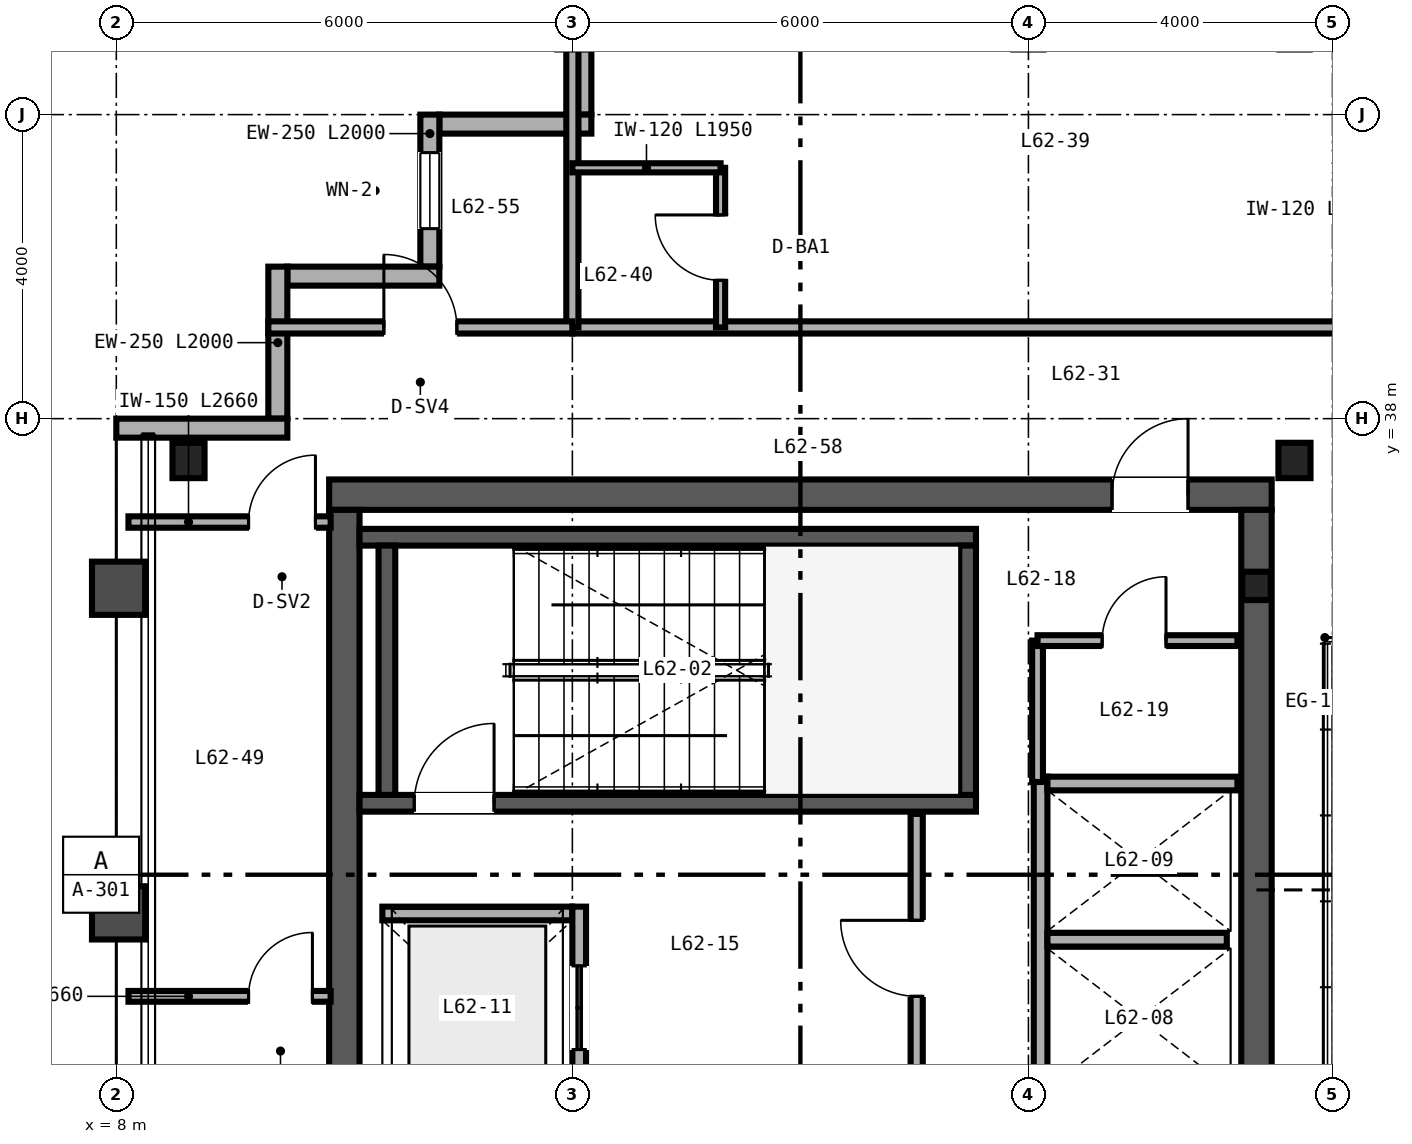
"""IFC4 building model, lengths in metres.
Left out: names, types, materials, properties, quantities, classifications, styles, units other than length and angle.
Written with IfcOpenShell. Run it as: python <this file> out.ifc"""

import sys

from ifc_helpers import new_model, si_unit, direction, frame, frame_2d, origin, origin_2d, place, context, subcontext, project, spatial, rectangle, i_section, extrude, source, transform, mapped, element, fill, save


model = new_model("IFC4")
c1 = context("Model", 3, precision=1e-05, world=origin(), true_north=direction((0.0, 1.0)))
c2 = subcontext(c1, "Body", "Model", "MODEL_VIEW")
j1 = project(units=[si_unit("LENGTHUNIT", "METRE"), si_unit("PLANEANGLEUNIT", "RADIAN")], contexts=[c1])
p1 = place(None, origin())
s1 = spatial("IfcSite", under=j1, at=p1, CompositionType="ELEMENT")
p2 = place(p1, origin())
s2 = spatial("IfcBuilding", under=s1, at=p2, CompositionType="ELEMENT")
p3 = place(p2, frame((0.0, 0.0, 247.2)))
s3 = spatial("IfcBuildingStorey", under=s2, at=p3, CompositionType="ELEMENT", Elevation=247.2)
m1 = source(origin(), c2, "Body", "SweptSolid", [
    extrude(i_section(OverallWidth=0.374, OverallDepth=0.373, WebThickness=0.016, FlangeThickness=0.026, FilletRadius=0.025, at=origin_2d()), origin(), (0.0, 0.0, 1.0), 3.6),
])
p4 = place(p3, frame((23.0, 35.8, 0.0), z_axis=(0.0, 0.0, 1.0), x_axis=(1.0, 0.0, 0.0)))
e1 = element("IfcColumn", 1, at=p4, inside=s3, PredefinedType="COLUMN", context=c2, shape_type="MappedRepresentation", body=[
    mapped(m1, transform((0.0, 0.0, 0.0), scale=1.0)),
])
p5 = place(p3, frame((10.8, 37.0, 0.0), z_axis=(0.0, 0.0, 1.0), x_axis=(1.0, 0.0, 0.0)))
e2 = element("IfcWall", 2, at=p5, inside=s3, PredefinedType="SHEAR", context=c2, shape_type="SweptSolid", body=[
    extrude(rectangle(XDim=12.4, YDim=0.4, at=frame_2d((6.2, 0.0))), origin(), (0.0, 0.0, 1.0), 3.38),
])
p6 = place(p5, frame((10.3, 0.0, 0.0)))
e3 = element("IfcOpeningElement", 3, at=p6, cuts=e2, PredefinedType="OPENING", context=c2, shape_type="SweptSolid", body=[
    extrude(rectangle(XDim=1.0, YDim=2.15, at=frame_2d((0.5, 1.075))), frame((0.0, 0.21, 0.0), z_axis=(0.0, -1.0, 0.0), x_axis=(1.0, 0.0, 0.0)), (0.0, 0.0, 1.0), 0.42),
])
for number, where, z_axis, x_axis in (
    (4, (11.0, 15.2, 0.0), (0.0, 0.0, 1.0), (0.0, 1.0, 0.0)),
    (5, (23.0, 15.2, 0.0), (0.0, 0.0, 1.0), (0.0, 1.0, 0.0)),
):
    element("IfcWall", number, at=place(p3, frame(where, z_axis=z_axis, x_axis=x_axis)), inside=s3, PredefinedType="SHEAR", context=c2, shape_type="SweptSolid", body=[
        extrude(rectangle(XDim=21.6, YDim=0.4, at=frame_2d((10.8, 0.0))), origin(), (0.0, 0.0, 1.0), 3.38),
    ])
p7 = place(p3, frame((11.2, 32.94, 0.0), z_axis=(0.0, 0.0, 1.0), x_axis=(1.0, 0.0, 0.0)))
e6 = element("IfcWall", 6, at=p7, inside=s3, PredefinedType="SHEAR", context=c2, shape_type="SweptSolid", body=[
    extrude(rectangle(XDim=8.11, YDim=0.22, at=frame_2d((4.055, 0.0))), origin(), (0.0, 0.0, 1.0), 3.4),
])
p8 = place(p7, frame((0.72, 0.0, 0.0)))
e7 = element("IfcOpeningElement", 7, at=p8, cuts=e6, PredefinedType="OPENING", context=c2, shape_type="SweptSolid", body=[
    extrude(rectangle(XDim=1.05, YDim=2.15, at=frame_2d((0.525, 1.075))), frame((0.0, 0.12, 0.0), z_axis=(0.0, -1.0, 0.0), x_axis=(1.0, 0.0, 0.0)), (0.0, 0.0, 1.0), 0.24),
])
p9 = place(p3, frame((11.2, 36.44, 0.0), z_axis=(0.0, 0.0, 1.0), x_axis=(1.0, 0.0, 0.0)))
e8 = element("IfcWall", 8, at=p9, inside=s3, PredefinedType="SHEAR", context=c2, shape_type="SweptSolid", body=[
    extrude(rectangle(XDim=8.11, YDim=0.22, at=frame_2d((4.055, 0.0))), origin(), (0.0, 0.0, 1.0), 3.4),
])
for number, where, z_axis, x_axis in (
    (9, (11.56, 33.05, 0.0), (0.0, 0.0, 1.0), (0.0, 1.0, 0.0)),
    (10, (19.2, 33.05, 0.0), (0.0, 0.0, 1.0), (0.0, 1.0, 0.0)),
):
    element("IfcWall", number, at=place(p3, frame(where, z_axis=z_axis, x_axis=x_axis)), inside=s3, PredefinedType="SHEAR", context=c2, shape_type="SweptSolid", body=[
        extrude(rectangle(XDim=3.28, YDim=0.22, at=frame_2d((1.64, 0.0))), origin(), (0.0, 0.0, 1.0), 3.4),
    ])
m2 = source(origin(), c2, "Body", "SweptSolid", [
    extrude(i_section(OverallWidth=0.422, OverallDepth=0.465, WebThickness=0.045, FlangeThickness=0.073, FilletRadius=0.025, at=origin_2d()), origin(), (0.0, 0.0, 1.0), 3.38),
])
for number, where, z_axis, x_axis in (
    (11, (8.95, 37.45, 0.0), (0.0, 0.0, 1.0), (1.0, 0.0, 0.0)),
    (12, (23.5, 37.45, 0.0), (0.0, 0.0, 1.0), (1.0, 0.0, 0.0)),
):
    element("IfcColumn", number, at=place(p3, frame(where, z_axis=z_axis, x_axis=x_axis)), inside=s3, PredefinedType="COLUMN", context=c2, shape_type="MappedRepresentation", body=[
        mapped(m2, transform((0.0, 0.0, 0.0), scale=1.0)),
    ])
p10 = place(p3, frame((14.125, 44.0, 0.0), z_axis=(0.0, 0.0, 1.0), x_axis=(0.0, -1.0, 0.0)))
e13 = element("IfcWall", 13, at=p10, inside=s3, PredefinedType="SOLIDWALL", context=c2, shape_type="SweptSolid", body=[
    extrude(rectangle(XDim=2.0, YDim=0.25, at=frame_2d((1.0, 0.0))), origin(), (0.0, 0.0, 1.0), 2.687),
])
p11 = place(p3, frame((14.25, 41.875, 0.0), z_axis=(0.0, 0.0, 1.0), x_axis=(-1.0, 0.0, 0.0)))
e14 = element("IfcWall", 14, at=p11, inside=s3, PredefinedType="SOLIDWALL", context=c2, shape_type="SweptSolid", body=[
    extrude(rectangle(XDim=2.0, YDim=0.25, at=frame_2d((1.0, 0.0))), origin(), (0.0, 0.0, 1.0), 3.38),
])
p12 = place(p3, frame((12.125, 42.0, 0.0), z_axis=(0.0, 0.0, 1.0), x_axis=(0.0, -1.0, 0.0)))
e15 = element("IfcWall", 15, at=p12, inside=s3, PredefinedType="SOLIDWALL", context=c2, shape_type="SweptSolid", body=[
    extrude(rectangle(XDim=2.0, YDim=0.25, at=frame_2d((1.0, 0.0))), origin(), (0.0, 0.0, 1.0), 3.38),
])
p13 = place(p12, frame((0.5, 0.0, 0.85)))
e16 = element("IfcOpeningElement", 16, at=p13, cuts=e15, PredefinedType="OPENING", context=c2, shape_type="SweptSolid", body=[
    extrude(rectangle(XDim=1.0, YDim=1.9, at=frame_2d((0.5, 0.95))), frame((0.0, 0.135, 0.0), z_axis=(0.0, -1.0, 0.0), x_axis=(1.0, 0.0, 0.0)), (0.0, 0.0, 1.0), 0.27),
])
for number, where, z_axis, x_axis in (
    (17, (12.25, 39.875, 0.0), (0.0, 0.0, 1.0), (-1.0, 0.0, 0.0)),
    (18, (10.125, 40.0, 0.0), (0.0, 0.0, 1.0), (0.0, -1.0, 0.0)),
):
    element("IfcWall", number, at=place(p3, frame(where, z_axis=z_axis, x_axis=x_axis)), inside=s3, PredefinedType="SOLIDWALL", context=c2, shape_type="SweptSolid", body=[
        extrude(rectangle(XDim=2.0, YDim=0.25, at=frame_2d((1.0, 0.0))), origin(), (0.0, 0.0, 1.0), 3.38),
    ])
p14 = place(p3, frame((10.25, 37.875, 0.0), z_axis=(0.0, 0.0, 1.0), x_axis=(-1.0, 0.0, 0.0)))
e19 = element("IfcWall", 19, at=p14, inside=s3, PredefinedType="SOLIDWALL", context=c2, shape_type="SweptSolid", body=[
    extrude(rectangle(XDim=2.25, YDim=0.25, at=frame_2d((1.125, 0.0))), origin(), (0.0, 0.0, 1.0), 3.38),
])
p15 = place(p3, frame((20.16, 29.0, 0.0), z_axis=(0.0, 0.0, 1.0), x_axis=(0.0, 1.0, 0.0)))
e20 = element("IfcWall", 20, at=p15, inside=s3, PredefinedType="SOLIDWALL", context=c2, shape_type="SweptSolid", body=[
    extrude(rectangle(XDim=4.29, YDim=0.18, at=frame_2d((2.145, 0.0))), origin(), (0.0, 0.0, 1.0), 3.38),
])
p16 = place(p3, frame((20.25, 33.2, 0.0), z_axis=(0.0, 0.0, 1.0), x_axis=(1.0, 0.0, 0.0)))
e21 = element("IfcWall", 21, at=p16, inside=s3, PredefinedType="SOLIDWALL", context=c2, shape_type="SweptSolid", body=[
    extrude(rectangle(XDim=2.5, YDim=0.18, at=frame_2d((1.25, 0.0))), origin(), (0.0, 0.0, 1.0), 3.38),
])
p17 = place(p3, frame((20.25, 31.145, 0.0), z_axis=(0.0, 0.0, 1.0), x_axis=(1.0, 0.0, 0.0)))
e22 = element("IfcWall", 22, at=p17, inside=s3, PredefinedType="SOLIDWALL", context=c2, shape_type="SweptSolid", body=[
    extrude(rectangle(XDim=2.36, YDim=0.18, at=frame_2d((1.18, 0.0))), origin(), (0.0, 0.0, 1.0), 3.38),
])
p18 = place(p3, frame((11.5, 31.49, 0.0), z_axis=(0.0, 0.0, 1.0), x_axis=(1.0, 0.0, 0.0)))
e23 = element("IfcWall", 23, at=p18, inside=s3, PredefinedType="SOLIDWALL", context=c2, shape_type="SweptSolid", body=[
    extrude(rectangle(XDim=2.5, YDim=0.18, at=frame_2d((1.25, 0.0))), origin(), (0.0, 0.0, 1.0), 3.38),
])
p19 = place(p3, frame((14.09, 28.92, 0.0), z_axis=(0.0, 0.0, 1.0), x_axis=(0.0, 1.0, 0.0)))
e24 = element("IfcWall", 24, at=p19, inside=s3, PredefinedType="SOLIDWALL", context=c2, shape_type="SweptSolid", body=[
    extrude(rectangle(XDim=2.66, YDim=0.18, at=frame_2d((1.33, 0.0))), origin(), (0.0, 0.0, 1.0), 3.38),
])
p20 = place(p19, frame((0.78, 0.0, 0.0)))
e25 = element("IfcOpeningElement", 25, at=p20, cuts=e24, PredefinedType="OPENING", context=c2, shape_type="SweptSolid", body=[
    extrude(rectangle(XDim=1.1, YDim=2.2, at=frame_2d((0.55, 1.1))), frame((0.0, 0.1, 0.0), z_axis=(0.0, -1.0, 0.0), x_axis=(1.0, 0.0, 0.0)), (0.0, 0.0, 1.0), 0.2),
])
p21 = place(p3, frame((18.53, 28.9, 0.0), z_axis=(0.0, 0.0, 1.0), x_axis=(0.0, 1.0, 0.0)))
e26 = element("IfcWall", 26, at=p21, inside=s3, PredefinedType="PARTITIONING", context=c2, shape_type="SweptSolid", body=[
    extrude(rectangle(XDim=3.9, YDim=0.16, at=frame_2d((1.95, 0.0))), origin(), (0.0, 0.0, 1.0), 3.38),
])
p22 = place(p21, frame((1.5, 0.0, 0.0)))
e27 = element("IfcOpeningElement", 27, at=p22, cuts=e26, PredefinedType="OPENING", context=c2, shape_type="SweptSolid", body=[
    extrude(rectangle(XDim=1.0, YDim=2.15, at=frame_2d((0.5, 1.075))), frame((0.0, 0.09, 0.0), z_axis=(0.0, -1.0, 0.0), x_axis=(1.0, 0.0, 0.0)), (0.0, 0.0, 1.0), 0.18),
])
p23 = place(p3, frame((20.12, 33.22, 0.0), z_axis=(0.0, 0.0, 1.0), x_axis=(0.0, 1.0, 0.0)))
e28 = element("IfcWall", 28, at=p23, inside=s3, PredefinedType="PARTITIONING", context=c2, shape_type="SweptSolid", body=[
    extrude(rectangle(XDim=1.86, YDim=0.142, at=frame_2d((0.93, 0.0))), origin(), (0.0, 0.0, 1.0), 3.38),
])
p24 = place(p3, frame((20.12, 35.08, 0.0), z_axis=(0.0, 0.0, 1.0), x_axis=(1.0, 0.0, 0.0)))
e29 = element("IfcWall", 29, at=p24, inside=s3, PredefinedType="PARTITIONING", context=c2, shape_type="SweptSolid", body=[
    extrude(rectangle(XDim=2.63, YDim=0.142, at=frame_2d((1.315, 0.0))), origin(), (0.0, 0.0, 1.0), 3.38),
])
p25 = place(p24, frame((0.85, 0.0, 0.0)))
e30 = element("IfcOpeningElement", 30, at=p25, cuts=e29, PredefinedType="OPENING", context=c2, shape_type="SweptSolid", body=[
    extrude(rectangle(XDim=0.84, YDim=2.1, at=frame_2d((0.42, 1.05))), frame((0.0, 0.081, 0.0), z_axis=(0.0, -1.0, 0.0), x_axis=(1.0, 0.0, 0.0)), (0.0, 0.0, 1.0), 0.162),
])
p26 = place(p3, frame((14.0, 39.2, 0.0), z_axis=(0.0, 0.0, 1.0), x_axis=(1.0, 0.0, 0.0)))
e31 = element("IfcWall", 31, at=p26, inside=s3, PredefinedType="PARTITIONING", context=c2, shape_type="SweptSolid", body=[
    extrude(rectangle(XDim=36.0, YDim=0.16, at=frame_2d((18.0, 0.0))), origin(), (0.0, 0.0, 1.0), 2.923),
])
p27 = place(p26, frame((10.7, 0.0, 0.0)))
e32 = element("IfcOpeningElement", 32, at=p27, cuts=e31, PredefinedType="OPENING", context=c2, shape_type="SweptSolid", body=[
    extrude(rectangle(XDim=0.98, YDim=2.2, at=frame_2d((0.49, 1.1))), frame((0.0, 0.09, 0.0), z_axis=(0.0, -1.0, 0.0), x_axis=(1.0, 0.0, 0.0)), (0.0, 0.0, 1.0), 0.18),
])
p28 = place(p26, frame((22.7, 0.0, 0.0)))
e33 = element("IfcOpeningElement", 33, at=p28, cuts=e31, PredefinedType="OPENING", context=c2, shape_type="SweptSolid", body=[
    extrude(rectangle(XDim=0.98, YDim=2.2, at=frame_2d((0.49, 1.1))), frame((0.0, 0.09, 0.0), z_axis=(0.0, -1.0, 0.0), x_axis=(1.0, 0.0, 0.0)), (0.0, 0.0, 1.0), 0.18),
])
p29 = place(p26, frame((34.7, 0.0, 0.0)))
e34 = element("IfcOpeningElement", 34, at=p29, cuts=e31, PredefinedType="OPENING", context=c2, shape_type="SweptSolid", body=[
    extrude(rectangle(XDim=0.98, YDim=2.2, at=frame_2d((0.49, 1.1))), frame((0.0, 0.09, 0.0), z_axis=(0.0, -1.0, 0.0), x_axis=(1.0, 0.0, 0.0)), (0.0, 0.0, 1.0), 0.18),
])
p30 = place(p3, frame((14.0, 39.2, 0.0), z_axis=(0.0, 0.0, 1.0), x_axis=(0.0, 1.0, 0.0)))
e35 = element("IfcWall", 35, at=p30, inside=s3, PredefinedType="PARTITIONING", context=c2, shape_type="SweptSolid", body=[
    extrude(rectangle(XDim=4.44, YDim=0.16, at=frame_2d((2.22, 0.0))), origin(), (0.0, 0.0, 1.0), 2.687),
])
p31 = place(p3, frame((15.95, 39.2, 0.0), z_axis=(0.0, 0.0, 1.0), x_axis=(0.0, 1.0, 0.0)))
e36 = element("IfcWall", 36, at=p31, inside=s3, PredefinedType="PARTITIONING", context=c2, shape_type="SweptSolid", body=[
    extrude(rectangle(XDim=2.1, YDim=0.12, at=frame_2d((1.05, 0.0))), origin(), (0.0, 0.0, 1.0), 3.38),
])
p32 = place(p31, frame((0.62, 0.0, 0.0)))
e37 = element("IfcOpeningElement", 37, at=p32, cuts=e36, PredefinedType="OPENING", context=c2, shape_type="SweptSolid", body=[
    extrude(rectangle(XDim=0.86, YDim=2.1, at=frame_2d((0.43, 1.05))), frame((0.0, 0.07, 0.0), z_axis=(0.0, -1.0, 0.0), x_axis=(1.0, 0.0, 0.0)), (0.0, 0.0, 1.0), 0.14),
])
p33 = place(p3, frame((14.0, 41.3, 0.0), z_axis=(0.0, 0.0, 1.0), x_axis=(1.0, 0.0, 0.0)))
e38 = element("IfcWall", 38, at=p33, inside=s3, PredefinedType="PARTITIONING", context=c2, shape_type="SweptSolid", body=[
    extrude(rectangle(XDim=1.95, YDim=0.12, at=frame_2d((0.975, 0.0))), origin(), (0.0, 0.0, 1.0), 3.38),
])
p34 = place(p3, frame((8.16, 36.64, 0.0), z_axis=(0.0, 0.0, 1.0), x_axis=(1.0, 0.0, 0.0)))
e39 = element("IfcWall", 39, at=p34, inside=s3, PredefinedType="PARTITIONING", context=c2, shape_type="SweptSolid", body=[
    extrude(rectangle(XDim=2.66, YDim=0.15, at=frame_2d((1.33, 0.0))), origin(), (0.0, 0.0, 1.0), 2.763),
])
p35 = place(p34, frame((1.58, 0.0, 0.0)))
e40 = element("IfcOpeningElement", 40, at=p35, cuts=e39, PredefinedType="OPENING", context=c2, shape_type="SweptSolid", body=[
    extrude(rectangle(XDim=0.88, YDim=2.15, at=frame_2d((0.44, 1.075))), frame((0.0, 0.085, 0.0), z_axis=(0.0, -1.0, 0.0), x_axis=(1.0, 0.0, 0.0)), (0.0, 0.0, 1.0), 0.17),
])
p36 = place(p3, frame((8.16, 30.4, 0.0), z_axis=(0.0, 0.0, 1.0), x_axis=(1.0, 0.0, 0.0)))
e41 = element("IfcWall", 41, at=p36, inside=s3, PredefinedType="PARTITIONING", context=c2, shape_type="SweptSolid", body=[
    extrude(rectangle(XDim=2.66, YDim=0.142, at=frame_2d((1.33, 0.0))), origin(), (0.0, 0.0, 1.0), 2.763),
])
p37 = place(p36, frame((1.58, 0.0, 0.0)))
e42 = element("IfcOpeningElement", 42, at=p37, cuts=e41, PredefinedType="OPENING", context=c2, shape_type="SweptSolid", body=[
    extrude(rectangle(XDim=0.84, YDim=2.1, at=frame_2d((0.42, 1.05))), frame((0.0, 0.081, 0.0), z_axis=(0.0, -1.0, 0.0), x_axis=(1.0, 0.0, 0.0)), (0.0, 0.0, 1.0), 0.162),
])
p38 = place(p3, frame((10.0, 39.2, 0.0), z_axis=(0.0, 0.0, 1.0), x_axis=(1.0, 0.0, 0.0)))
e43 = element("IfcWall", 43, at=p38, inside=s3, PredefinedType="PARTITIONING", context=c2, shape_type="SweptSolid", body=[
    extrude(rectangle(XDim=4.0, YDim=0.16, at=frame_2d((2.0, 0.0))), origin(), (0.0, 0.0, 1.0), 3.38),
])
p39 = place(p38, frame((1.52, 0.0, 0.0)))
e44 = element("IfcOpeningElement", 44, at=p39, cuts=e43, PredefinedType="OPENING", context=c2, shape_type="SweptSolid", body=[
    extrude(rectangle(XDim=0.96, YDim=2.15, at=frame_2d((0.48, 1.075))), frame((0.0, 0.09, 0.0), z_axis=(0.0, -1.0, 0.0), x_axis=(1.0, 0.0, 0.0)), (0.0, 0.0, 1.0), 0.18),
])
m3 = source(origin(), c2, "Body", "SweptSolid", [
    extrude(rectangle(XDim=1.0, YDim=1.9, at=frame_2d((0.5, 0.95))), frame((0.0, 0.03, 0.0), z_axis=(0.0, -1.0, 0.0), x_axis=(1.0, 0.0, 0.0)), (0.0, 0.0, 1.0), 0.06),
])
p40 = place(p13, origin())
e45 = element("IfcWindow", 45, at=p40, inside=s3, PartitioningType="SINGLE_PANEL", PredefinedType="WINDOW", context=c2, shape_type="MappedRepresentation", body=[
    mapped(m3, transform((0.0, 0.0, 0.0), scale=1.0)),
])
fill(e16, e45)
m4 = source(origin(), c2, "Body", "SweptSolid", [
    extrude(rectangle(XDim=1.05, YDim=2.15, at=frame_2d((0.525, 1.075))), frame((0.0, 0.025, 0.0), z_axis=(0.0, -1.0, 0.0), x_axis=(1.0, 0.0, 0.0)), (0.0, 0.0, 1.0), 0.05),
])
p41 = place(p8, origin())
e46 = element("IfcDoor", 46, at=p41, inside=s3, OperationType="SINGLE_SWING_RIGHT", PredefinedType="DOOR", context=c2, shape_type="MappedRepresentation", body=[
    mapped(m4, transform((0.0, 0.0, 0.0), scale=1.0)),
])
fill(e7, e46)
m5 = source(origin(), c2, "Body", "SweptSolid", [
    extrude(rectangle(XDim=1.1, YDim=2.2, at=frame_2d((0.55, 1.1))), frame((0.0, 0.025, 0.0), z_axis=(0.0, -1.0, 0.0), x_axis=(1.0, 0.0, 0.0)), (0.0, 0.0, 1.0), 0.05),
])
p42 = place(p20, origin())
e47 = element("IfcDoor", 47, at=p42, inside=s3, OperationType="DOUBLE_DOOR_SLIDING", PredefinedType="DOOR", context=c2, shape_type="MappedRepresentation", body=[
    mapped(m5, transform((0.0, 0.0, 0.0), scale=1.0)),
])
fill(e25, e47)
m6 = source(origin(), c2, "Body", "SweptSolid", [
    extrude(rectangle(XDim=1.0, YDim=2.15, at=frame_2d((0.5, 1.075))), frame((0.0, 0.025, 0.0), z_axis=(0.0, -1.0, 0.0), x_axis=(1.0, 0.0, 0.0)), (0.0, 0.0, 1.0), 0.05),
])
p43 = place(p22, origin())
e48 = element("IfcDoor", 48, at=p43, inside=s3, OperationType="SINGLE_SWING_RIGHT", PredefinedType="DOOR", context=c2, shape_type="MappedRepresentation", body=[
    mapped(m6, transform((0.0, 0.0, 0.0), scale=1.0)),
])
fill(e27, e48)
m7 = source(origin(), c2, "Body", "SweptSolid", [
    extrude(rectangle(XDim=0.84, YDim=2.1, at=frame_2d((0.42, 1.05))), frame((0.0, 0.025, 0.0), z_axis=(0.0, -1.0, 0.0), x_axis=(1.0, 0.0, 0.0)), (0.0, 0.0, 1.0), 0.05),
])
p44 = place(p25, origin())
e49 = element("IfcDoor", 49, at=p44, inside=s3, OperationType="SINGLE_SWING_RIGHT", PredefinedType="DOOR", context=c2, shape_type="MappedRepresentation", body=[
    mapped(m7, transform((0.0, 0.0, 0.0), scale=1.0)),
])
fill(e30, e49)
p45 = place(p6, origin())
e50 = element("IfcDoor", 50, at=p45, inside=s3, OperationType="SINGLE_SWING_RIGHT", PredefinedType="DOOR", context=c2, shape_type="MappedRepresentation", body=[
    mapped(m6, transform((0.0, 0.0, 0.0), scale=1.0)),
])
fill(e3, e50)
m8 = source(origin(), c2, "Body", "SweptSolid", [
    extrude(rectangle(XDim=0.86, YDim=2.1, at=frame_2d((0.43, 1.05))), frame((0.0, 0.025, 0.0), z_axis=(0.0, -1.0, 0.0), x_axis=(1.0, 0.0, 0.0)), (0.0, 0.0, 1.0), 0.05),
])
p46 = place(p32, origin())
e51 = element("IfcDoor", 51, at=p46, inside=s3, OperationType="SINGLE_SWING_RIGHT", PredefinedType="DOOR", context=c2, shape_type="MappedRepresentation", body=[
    mapped(m8, transform((0.0, 0.0, 0.0), scale=1.0)),
])
fill(e37, e51)
m9 = source(origin(), c2, "Body", "SweptSolid", [
    extrude(rectangle(XDim=0.88, YDim=2.15, at=frame_2d((0.44, 1.075))), frame((0.0, 0.025, 0.0), z_axis=(0.0, -1.0, 0.0), x_axis=(1.0, 0.0, 0.0)), (0.0, 0.0, 1.0), 0.05),
])
p47 = place(p35, origin())
e52 = element("IfcDoor", 52, at=p47, inside=s3, OperationType="SINGLE_SWING_RIGHT", PredefinedType="DOOR", context=c2, shape_type="MappedRepresentation", body=[
    mapped(m9, transform((0.0, 0.0, 0.0), scale=1.0)),
])
fill(e40, e52)
p48 = place(p37, origin())
e53 = element("IfcDoor", 53, at=p48, inside=s3, OperationType="SINGLE_SWING_RIGHT", PredefinedType="DOOR", context=c2, shape_type="MappedRepresentation", body=[
    mapped(m7, transform((0.0, 0.0, 0.0), scale=1.0)),
])
fill(e42, e53)
m10 = source(origin(), c2, "Body", "SweptSolid", [
    extrude(rectangle(XDim=0.96, YDim=2.15, at=frame_2d((0.48, 1.075))), frame((0.0, 0.025, 0.0), z_axis=(0.0, -1.0, 0.0), x_axis=(1.0, 0.0, 0.0)), (0.0, 0.0, 1.0), 0.05),
])
p49 = place(p39, origin())
e54 = element("IfcDoor", 54, at=p49, inside=s3, OperationType="SINGLE_SWING_LEFT", PredefinedType="DOOR", context=c2, shape_type="MappedRepresentation", body=[
    mapped(m10, transform((0.0, 0.0, 0.0), scale=1.0)),
])
fill(e44, e54)
save(model, sys.argv[1])
